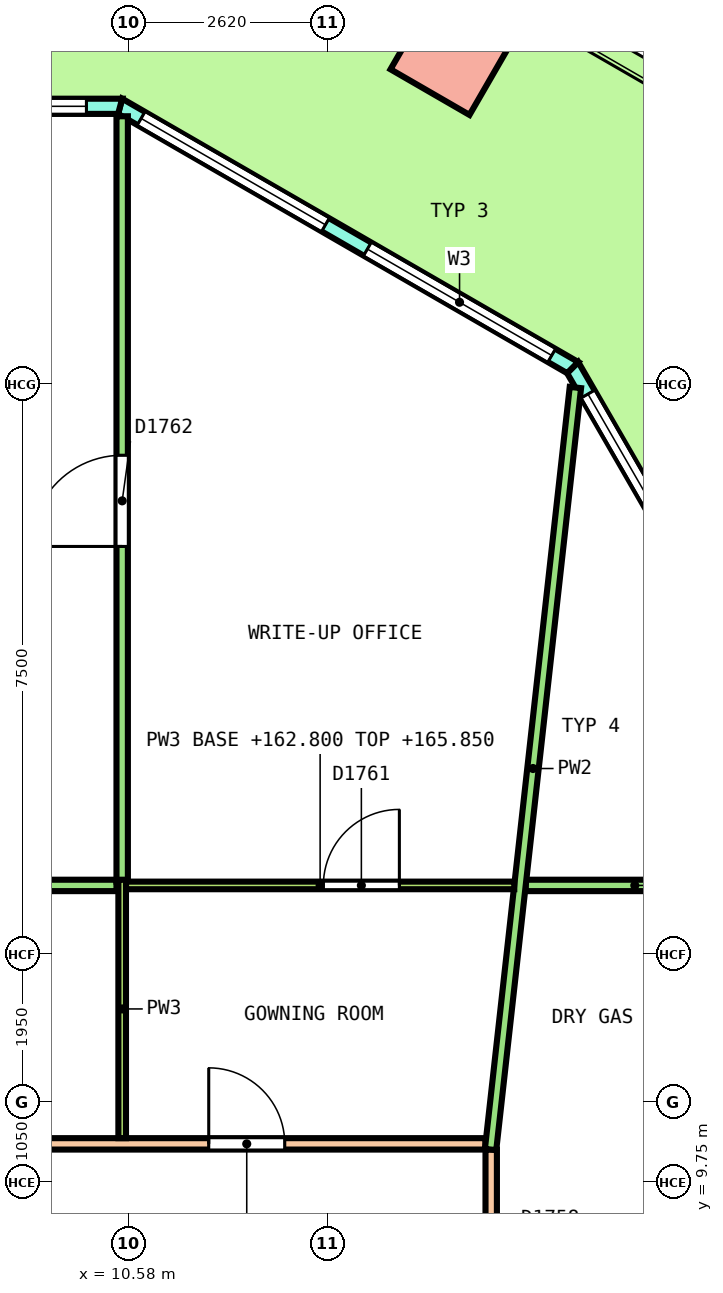
"""IFC4 building model, lengths in metres.
Left out: names, types, materials, properties, quantities, classifications, styles, units other than length and angle.
Written with IfcOpenShell. Run it as: python <this file> out.ifc"""

import sys

from ifc_helpers import new_model, si_unit, direction, frame, frame_2d, origin, origin_2d, place, context, subcontext, project, spatial, polyline, rectangle, outline, extrude, element, fill, save


model = new_model("IFC4")
c1 = context("Model", 3, precision=1e-05, world=origin(), true_north=direction((0.0, 1.0)))
c2 = subcontext(c1, "Body", "Model", "MODEL_VIEW")
j1 = project(units=[si_unit("LENGTHUNIT", "METRE"), si_unit("PLANEANGLEUNIT", "RADIAN")], contexts=[c1])
p1 = place(None, origin())
s1 = spatial("IfcSite", under=j1, at=p1, CompositionType="ELEMENT")
p2 = place(p1, origin())
s2 = spatial("IfcBuilding", under=s1, at=p2, CompositionType="ELEMENT")
p3 = place(p2, frame((0.0, 0.0, 162.8)))
s3 = spatial("IfcBuildingStorey", under=s2, at=p3, CompositionType="ELEMENT", Elevation=162.8)
p4 = place(p3, frame((14.845, 24.606, 0.0), z_axis=(0.036205074038, 0.0, 0.999344381389), x_axis=(-0.865315435316, 0.500246354177, 0.031349362627)))
e1 = element("IfcColumn", 1, at=p4, inside=s3, PredefinedType="COLUMN", context=c2, shape_type="SweptSolid", body=[
    extrude(rectangle(XDim=1.2, YDim=1.2, at=origin_2d()), origin(), (0.0, 0.0, 1.0), 4.053),
])
p5 = place(p3, frame((25.932, 3.99, 0.0), z_axis=(0.0, 0.0, 1.0), x_axis=(-0.500001707189, 0.866024418136, 0.0)))
e2 = element("IfcWall", 2, at=p5, inside=s3, PredefinedType="SOLIDWALL", context=c2, shape_type="SweptSolid", body=[
    extrude(outline(polyline([(-0.027, -0.1), (0.977, -0.1), (1.981, -0.1), (2.985, -0.1), (3.989, -0.1), (4.993, -0.1), (5.997, -0.1), (7.0, -0.1), (8.004, -0.1), (9.008, -0.1), (10.012, -0.1), (11.016, -0.1), (12.02, -0.1), (13.024, -0.1), (14.028, -0.1), (15.032, -0.1), (16.036, -0.1), (17.04, -0.1), (18.043, -0.1), (19.047, -0.1), (18.994, 0.1), (17.995, 0.1), (16.997, 0.1), (15.999, 0.1), (15.001, 0.1), (14.002, 0.1), (13.004, 0.1), (12.006, 0.1), (11.008, 0.1), (10.009, 0.1), (9.011, 0.1), (8.013, 0.1), (7.015, 0.1), (6.016, 0.1), (5.018, 0.1), (4.02, 0.1), (3.022, 0.1), (2.023, 0.1), (1.025, 0.1), (0.027, 0.1), (-0.027, -0.1)])), origin(), (0.0, 0.0, 1.0), 4.1),
])
p6 = place(p5, frame((0.402, 0.0, 0.1)))
e3 = element("IfcOpeningElement", 3, at=p6, cuts=e2, PredefinedType="OPENING", context=c2, shape_type="SweptSolid", body=[
    extrude(rectangle(XDim=3.0, YDim=2.9, at=frame_2d((1.5, 1.45))), frame((0.0, 0.11, 0.0), z_axis=(0.0, -1.0, 0.0), x_axis=(1.0, 0.0, 0.0)), (0.0, 0.0, 1.0), 0.22),
])
p7 = place(p5, frame((4.206, 0.0, 0.1)))
e4 = element("IfcOpeningElement", 4, at=p7, cuts=e2, PredefinedType="OPENING", context=c2, shape_type="SweptSolid", body=[
    extrude(rectangle(XDim=3.0, YDim=2.9, at=frame_2d((1.5, 1.45))), frame((0.0, 0.11, 0.0), z_axis=(0.0, -1.0, 0.0), x_axis=(1.0, 0.0, 0.0)), (0.0, 0.0, 1.0), 0.22),
])
p8 = place(p5, frame((8.61, 0.0, 0.0)))
e5 = element("IfcOpeningElement", 5, at=p8, cuts=e2, PredefinedType="OPENING", context=c2, shape_type="SweptSolid", body=[
    extrude(rectangle(XDim=1.8, YDim=2.4, at=frame_2d((0.9, 1.2))), frame((0.0, 0.11, 0.0), z_axis=(0.0, -1.0, 0.0), x_axis=(1.0, 0.0, 0.0)), (0.0, 0.0, 1.0), 0.22),
])
p9 = place(p5, frame((8.61, 0.0, 2.55)))
e6 = element("IfcOpeningElement", 6, at=p9, cuts=e2, PredefinedType="OPENING", context=c2, shape_type="SweptSolid", body=[
    extrude(rectangle(XDim=1.8, YDim=0.45, at=frame_2d((0.9, 0.225))), frame((0.0, 0.11, 0.0), z_axis=(0.0, -1.0, 0.0), x_axis=(1.0, 0.0, 0.0)), (0.0, 0.0, 1.0), 0.22),
])
p10 = place(p5, frame((11.814, 0.0, 0.1)))
e7 = element("IfcOpeningElement", 7, at=p10, cuts=e2, PredefinedType="OPENING", context=c2, shape_type="SweptSolid", body=[
    extrude(rectangle(XDim=3.0, YDim=2.9, at=frame_2d((1.5, 1.45))), frame((0.0, 0.11, 0.0), z_axis=(0.0, -1.0, 0.0), x_axis=(1.0, 0.0, 0.0)), (0.0, 0.0, 1.0), 0.22),
])
p11 = place(p5, frame((15.618, 0.0, 0.1)))
e8 = element("IfcOpeningElement", 8, at=p11, cuts=e2, PredefinedType="OPENING", context=c2, shape_type="SweptSolid", body=[
    extrude(rectangle(XDim=3.0, YDim=2.9, at=frame_2d((1.5, 1.45))), frame((0.0, 0.11, 0.0), z_axis=(0.0, -1.0, 0.0), x_axis=(1.0, 0.0, 0.0)), (0.0, 0.0, 1.0), 0.22),
])
p12 = place(p3, frame((16.422, 20.463, 0.0), z_axis=(0.0, 0.0, 1.0), x_axis=(-0.866029458321, 0.49999297727, 0.0)))
e9 = element("IfcWall", 9, at=p12, inside=s3, PredefinedType="SOLIDWALL", context=c2, shape_type="SweptSolid", body=[
    extrude(outline(polyline([(-0.027, -0.1), (1.128, -0.1), (2.282, -0.1), (3.437, -0.1), (4.592, -0.1), (5.747, -0.1), (6.901, -0.1), (6.848, 0.1), (5.711, 0.1), (4.574, 0.1), (3.437, 0.1), (2.301, 0.1), (1.164, 0.1), (0.027, 0.1), (-0.027, -0.1)])), origin(), (0.0, 0.0, 1.0), 4.1),
])
p13 = place(p12, frame((0.319, 0.0, 0.1)))
e10 = element("IfcOpeningElement", 10, at=p13, cuts=e9, PredefinedType="OPENING", context=c2, shape_type="SweptSolid", body=[
    extrude(rectangle(XDim=2.8, YDim=2.9, at=frame_2d((1.4, 1.45))), frame((0.0, 0.11, 0.0), z_axis=(0.0, -1.0, 0.0), x_axis=(1.0, 0.0, 0.0)), (0.0, 0.0, 1.0), 0.22),
])
p14 = place(p12, frame((3.756, 0.0, 0.1)))
e11 = element("IfcOpeningElement", 11, at=p14, cuts=e9, PredefinedType="OPENING", context=c2, shape_type="SweptSolid", body=[
    extrude(rectangle(XDim=2.8, YDim=2.9, at=frame_2d((1.4, 1.45))), frame((0.0, 0.11, 0.0), z_axis=(0.0, -1.0, 0.0), x_axis=(1.0, 0.0, 0.0)), (0.0, 0.0, 1.0), 0.22),
])
p15 = place(p3, frame((10.468, 23.9, 0.0), z_axis=(0.0, 0.0, 1.0), x_axis=(-1.0, 0.0, 0.0)))
e12 = element("IfcWall", 12, at=p15, inside=s3, PredefinedType="SOLIDWALL", context=c2, shape_type="SweptSolid", body=[
    extrude(outline(polyline([(-0.027, -0.1), (1.023, -0.1), (2.072, -0.1), (3.122, -0.1), (4.171, -0.1), (5.221, -0.1), (6.27, -0.1), (7.32, -0.1), (8.369, -0.1), (9.419, -0.1), (10.468, -0.1), (11.518, -0.1), (12.567, -0.1), (13.617, -0.1), (14.666, -0.1), (15.716, -0.1), (16.765, -0.1), (17.815, -0.1), (18.864, -0.1), (19.914, -0.1), (20.963, -0.1), (20.91, 0.1), (19.865, 0.1), (18.821, 0.1), (17.777, 0.1), (16.733, 0.1), (15.689, 0.1), (14.645, 0.1), (13.601, 0.1), (12.557, 0.1), (11.512, 0.1), (10.468, 0.1), (9.424, 0.1), (8.38, 0.1), (7.336, 0.1), (6.292, 0.1), (5.248, 0.1), (4.203, 0.1), (3.159, 0.1), (2.115, 0.1), (1.071, 0.1), (0.027, 0.1), (-0.027, -0.1)])), origin(), (0.0, 0.0, 1.0), 4.1),
])
p16 = place(p15, frame((0.444, 0.0, 0.1)))
e13 = element("IfcOpeningElement", 13, at=p16, cuts=e12, PredefinedType="OPENING", context=c2, shape_type="SweptSolid", body=[
    extrude(rectangle(XDim=3.3, YDim=2.9, at=frame_2d((1.65, 1.45))), frame((0.0, 0.11, 0.0), z_axis=(0.0, -1.0, 0.0), x_axis=(1.0, 0.0, 0.0)), (0.0, 0.0, 1.0), 0.22),
])
p17 = place(p15, frame((4.631, 0.0, 0.1)))
e14 = element("IfcOpeningElement", 14, at=p17, cuts=e12, PredefinedType="OPENING", context=c2, shape_type="SweptSolid", body=[
    extrude(rectangle(XDim=3.3, YDim=2.9, at=frame_2d((1.65, 1.45))), frame((0.0, 0.11, 0.0), z_axis=(0.0, -1.0, 0.0), x_axis=(1.0, 0.0, 0.0)), (0.0, 0.0, 1.0), 0.22),
])
p18 = place(p15, frame((9.568, 0.0, 0.0)))
e15 = element("IfcOpeningElement", 15, at=p18, cuts=e12, PredefinedType="OPENING", context=c2, shape_type="SweptSolid", body=[
    extrude(rectangle(XDim=1.8, YDim=2.4, at=frame_2d((0.9, 1.2))), frame((0.0, 0.11, 0.0), z_axis=(0.0, -1.0, 0.0), x_axis=(1.0, 0.0, 0.0)), (0.0, 0.0, 1.0), 0.22),
])
p19 = place(p15, frame((9.568, 0.0, 2.55)))
e16 = element("IfcOpeningElement", 16, at=p19, cuts=e12, PredefinedType="OPENING", context=c2, shape_type="SweptSolid", body=[
    extrude(rectangle(XDim=1.8, YDim=0.45, at=frame_2d((0.9, 0.225))), frame((0.0, 0.11, 0.0), z_axis=(0.0, -1.0, 0.0), x_axis=(1.0, 0.0, 0.0)), (0.0, 0.0, 1.0), 0.22),
])
p20 = place(p15, frame((13.006, 0.0, 0.1)))
e17 = element("IfcOpeningElement", 17, at=p20, cuts=e12, PredefinedType="OPENING", context=c2, shape_type="SweptSolid", body=[
    extrude(rectangle(XDim=3.3, YDim=2.9, at=frame_2d((1.65, 1.45))), frame((0.0, 0.11, 0.0), z_axis=(0.0, -1.0, 0.0), x_axis=(1.0, 0.0, 0.0)), (0.0, 0.0, 1.0), 0.22),
])
p21 = place(p15, frame((17.193, 0.0, 0.1)))
e18 = element("IfcOpeningElement", 18, at=p21, cuts=e12, PredefinedType="OPENING", context=c2, shape_type="SweptSolid", body=[
    extrude(rectangle(XDim=3.3, YDim=2.9, at=frame_2d((1.65, 1.45))), frame((0.0, 0.11, 0.0), z_axis=(0.0, -1.0, 0.0), x_axis=(1.0, 0.0, 0.0)), (0.0, 0.0, 1.0), 0.22),
])
p22 = place(p3, frame((15.35, -0.254, 0.0), z_axis=(0.0, 0.0, 1.0), x_axis=(0.0, 1.0, 0.0)))
e19 = element("IfcWall", 19, at=p22, inside=s3, PredefinedType="PARTITIONING", context=c2, shape_type="SweptSolid", body=[
    extrude(rectangle(XDim=10.429, YDim=0.15, at=frame_2d((5.214, 0.0))), origin(), (0.0, 0.0, 1.0), 3.05),
])
p23 = place(p22, frame((8.232, 0.0, 0.0)))
e20 = element("IfcOpeningElement", 20, at=p23, cuts=e19, PredefinedType="OPENING", context=c2, shape_type="SweptSolid", body=[
    extrude(rectangle(XDim=1.0, YDim=2.1, at=frame_2d((0.5, 1.05))), frame((0.0, 0.085, 0.0), z_axis=(0.0, -1.0, 0.0), x_axis=(1.0, 0.0, 0.0)), (0.0, 0.0, 1.0), 0.17),
])
p24 = place(p3, frame((-15.275, 10.25, 0.0), z_axis=(0.0, 0.0, 1.0), x_axis=(1.0, 0.0, 0.0)))
e21 = element("IfcWall", 21, at=p24, inside=s3, PredefinedType="PARTITIONING", context=c2, shape_type="SweptSolid", body=[
    extrude(rectangle(XDim=30.55, YDim=0.15, at=frame_2d((15.275, 0.0))), origin(), (0.0, 0.0, 1.0), 3.05),
])
p25 = place(p24, frame((26.909, 0.0, 0.0)))
e22 = element("IfcOpeningElement", 22, at=p25, cuts=e21, PredefinedType="OPENING", context=c2, shape_type="SweptSolid", body=[
    extrude(rectangle(XDim=1.0, YDim=2.1, at=frame_2d((0.5, 1.05))), frame((0.0, 0.085, 0.0), z_axis=(0.0, -1.0, 0.0), x_axis=(1.0, 0.0, 0.0)), (0.0, 0.0, 1.0), 0.17),
])
p26 = place(p24, frame((14.675, 0.0, 0.0)))
e23 = element("IfcOpeningElement", 23, at=p26, cuts=e21, PredefinedType="OPENING", context=c2, shape_type="SweptSolid", body=[
    extrude(rectangle(XDim=1.2, YDim=2.1, at=frame_2d((0.6, 1.05))), frame((0.0, 0.085, 0.0), z_axis=(0.0, -1.0, 0.0), x_axis=(1.0, 0.0, 0.0)), (0.0, 0.0, 1.0), 0.17),
])
p27 = place(p24, frame((2.326, 0.0, 0.0)))
e24 = element("IfcOpeningElement", 24, at=p27, cuts=e21, PredefinedType="OPENING", context=c2, shape_type="SweptSolid", body=[
    extrude(rectangle(XDim=1.0, YDim=2.1, at=frame_2d((0.5, 1.05))), frame((0.0, 0.085, 0.0), z_axis=(0.0, -1.0, 0.0), x_axis=(1.0, 0.0, 0.0)), (0.0, 0.0, 1.0), 0.17),
])
p28 = place(p3, frame((-16.761, 13.65, 0.0), z_axis=(0.0, 0.0, 1.0), x_axis=(1.0, 0.0, 0.0)))
e25 = element("IfcWall", 25, at=p28, inside=s3, PredefinedType="PARTITIONING", context=c2, shape_type="SweptSolid", body=[
    extrude(rectangle(XDim=27.182, YDim=0.15, at=frame_2d((13.591, 0.0))), origin(), (0.0, 0.0, 1.0), 3.05),
])
p29 = place(p3, frame((15.803, 13.65, 0.0), z_axis=(0.0, 0.0, 1.0), x_axis=(1.0, 0.0, 0.0)))
e26 = element("IfcWall", 26, at=p29, inside=s3, PredefinedType="PARTITIONING", context=c2, shape_type="SweptSolid", body=[
    extrude(rectangle(XDim=2.872, YDim=0.15, at=frame_2d((1.436, 0.0))), origin(), (0.0, 0.0, 1.0), 4.1),
])
p30 = place(p3, frame((15.342, 10.176, 0.0), z_axis=(0.0, 0.0, 1.0), x_axis=(0.110633414976, 0.993861281815, 0.0)))
e27 = element("IfcWall", 27, at=p30, inside=s3, PredefinedType="PARTITIONING", context=c2, shape_type="SweptSolid", body=[
    extrude(rectangle(XDim=10.087, YDim=0.15, at=frame_2d((5.043, 0.0))), origin(), (0.0, 0.0, 1.0), 3.05),
])
p31 = place(p3, frame((10.495, 13.7, 0.0), z_axis=(0.0, 0.0, 1.0), x_axis=(0.0, 1.0, 0.0)))
e28 = element("IfcWall", 28, at=p31, inside=s3, PredefinedType="PARTITIONING", context=c2, shape_type="SweptSolid", body=[
    extrude(rectangle(XDim=10.069, YDim=0.15, at=frame_2d((5.035, 0.0))), origin(), (0.0, 0.0, 1.0), 3.05),
])
p32 = place(p31, frame((4.409, 0.0, 0.0)))
e29 = element("IfcOpeningElement", 29, at=p32, cuts=e28, PredefinedType="OPENING", context=c2, shape_type="SweptSolid", body=[
    extrude(rectangle(XDim=1.2, YDim=2.1, at=frame_2d((0.6, 1.05))), frame((0.0, 0.085, 0.0), z_axis=(0.0, -1.0, 0.0), x_axis=(1.0, 0.0, 0.0)), (0.0, 0.0, 1.0), 0.17),
])
p33 = place(p3, frame((10.545, 13.65, 0.0), z_axis=(0.0, 0.0, 1.0), x_axis=(1.0, 0.0, 0.0)))
e30 = element("IfcWall", 30, at=p33, inside=s3, PredefinedType="PARTITIONING", context=c2, shape_type="SweptSolid", body=[
    extrude(rectangle(XDim=5.108, YDim=0.1, at=frame_2d((2.554, 0.0))), origin(), (0.0, 0.0, 1.0), 3.05),
])
p34 = place(p33, frame((2.597, 0.0, 0.0)))
e31 = element("IfcOpeningElement", 31, at=p34, cuts=e30, PredefinedType="OPENING", context=c2, shape_type="SweptSolid", body=[
    extrude(rectangle(XDim=1.0, YDim=2.1, at=frame_2d((0.5, 1.05))), frame((0.0, 0.06, 0.0), z_axis=(0.0, -1.0, 0.0), x_axis=(1.0, 0.0, 0.0)), (0.0, 0.0, 1.0), 0.12),
])
p35 = place(p3, frame((10.495, 10.325, 0.0), z_axis=(0.0, 0.0, 1.0), x_axis=(0.0, 1.0, 0.0)))
e32 = element("IfcWall", 32, at=p35, inside=s3, PredefinedType="PARTITIONING", context=c2, shape_type="SweptSolid", body=[
    extrude(rectangle(XDim=3.4, YDim=0.1, at=frame_2d((1.7, 0.0))), origin(), (0.0, 0.0, 1.0), 3.05),
])
p36 = place(p11, origin())
e33 = element("IfcWindow", 33, at=p36, inside=s3, PartitioningType="SINGLE_PANEL", PredefinedType="WINDOW", context=c2, shape_type="SweptSolid", body=[
    extrude(rectangle(XDim=3.0, YDim=2.9, at=frame_2d((1.5, 1.45))), frame((0.0, 0.03, 0.0), z_axis=(0.0, -1.0, 0.0), x_axis=(1.0, 0.0, 0.0)), (0.0, 0.0, 1.0), 0.06),
])
fill(e8, e33)
p37 = place(p13, origin())
e34 = element("IfcWindow", 34, at=p37, inside=s3, PartitioningType="SINGLE_PANEL", PredefinedType="WINDOW", context=c2, shape_type="SweptSolid", body=[
    extrude(rectangle(XDim=2.8, YDim=2.9, at=frame_2d((1.4, 1.45))), frame((0.0, 0.03, 0.0), z_axis=(0.0, -1.0, 0.0), x_axis=(1.0, 0.0, 0.0)), (0.0, 0.0, 1.0), 0.06),
])
fill(e10, e34)
p38 = place(p14, origin())
e35 = element("IfcWindow", 35, at=p38, inside=s3, PartitioningType="SINGLE_PANEL", PredefinedType="WINDOW", context=c2, shape_type="SweptSolid", body=[
    extrude(rectangle(XDim=2.8, YDim=2.9, at=frame_2d((1.4, 1.45))), frame((0.0, 0.03, 0.0), z_axis=(0.0, -1.0, 0.0), x_axis=(1.0, 0.0, 0.0)), (0.0, 0.0, 1.0), 0.06),
])
fill(e11, e35)
p39 = place(p16, origin())
e36 = element("IfcWindow", 36, at=p39, inside=s3, PartitioningType="SINGLE_PANEL", PredefinedType="WINDOW", context=c2, shape_type="SweptSolid", body=[
    extrude(rectangle(XDim=3.3, YDim=2.9, at=frame_2d((1.65, 1.45))), frame((0.0, 0.03, 0.0), z_axis=(0.0, -1.0, 0.0), x_axis=(1.0, 0.0, 0.0)), (0.0, 0.0, 1.0), 0.06),
])
fill(e13, e36)
p40 = place(p25, origin())
e37 = element("IfcDoor", 37, at=p40, inside=s3, OperationType="SINGLE_SWING_RIGHT", PredefinedType="DOOR", context=c2, shape_type="SweptSolid", body=[
    extrude(rectangle(XDim=1.0, YDim=2.1, at=frame_2d((0.5, 1.05))), frame((0.0, 0.025, 0.0), z_axis=(0.0, -1.0, 0.0), x_axis=(1.0, 0.0, 0.0)), (0.0, 0.0, 1.0), 0.05),
])
fill(e22, e37)
p41 = place(p34, origin())
e38 = element("IfcDoor", 38, at=p41, inside=s3, OperationType="SINGLE_SWING_LEFT", PredefinedType="DOOR", context=c2, shape_type="SweptSolid", body=[
    extrude(rectangle(XDim=1.0, YDim=2.1, at=frame_2d((0.5, 1.05))), frame((0.0, 0.025, 0.0), z_axis=(0.0, -1.0, 0.0), x_axis=(1.0, 0.0, 0.0)), (0.0, 0.0, 1.0), 0.05),
])
fill(e31, e38)
p42 = place(p32, origin())
e39 = element("IfcDoor", 39, at=p42, inside=s3, OperationType="DOUBLE_DOOR_SINGLE_SWING", PredefinedType="DOOR", context=c2, shape_type="SweptSolid", body=[
    extrude(rectangle(XDim=1.2, YDim=2.1, at=frame_2d((0.6, 1.05))), frame((0.0, 0.025, 0.0), z_axis=(0.0, -1.0, 0.0), x_axis=(1.0, 0.0, 0.0)), (0.0, 0.0, 1.0), 0.05),
])
fill(e29, e39)
save(model, sys.argv[1])
